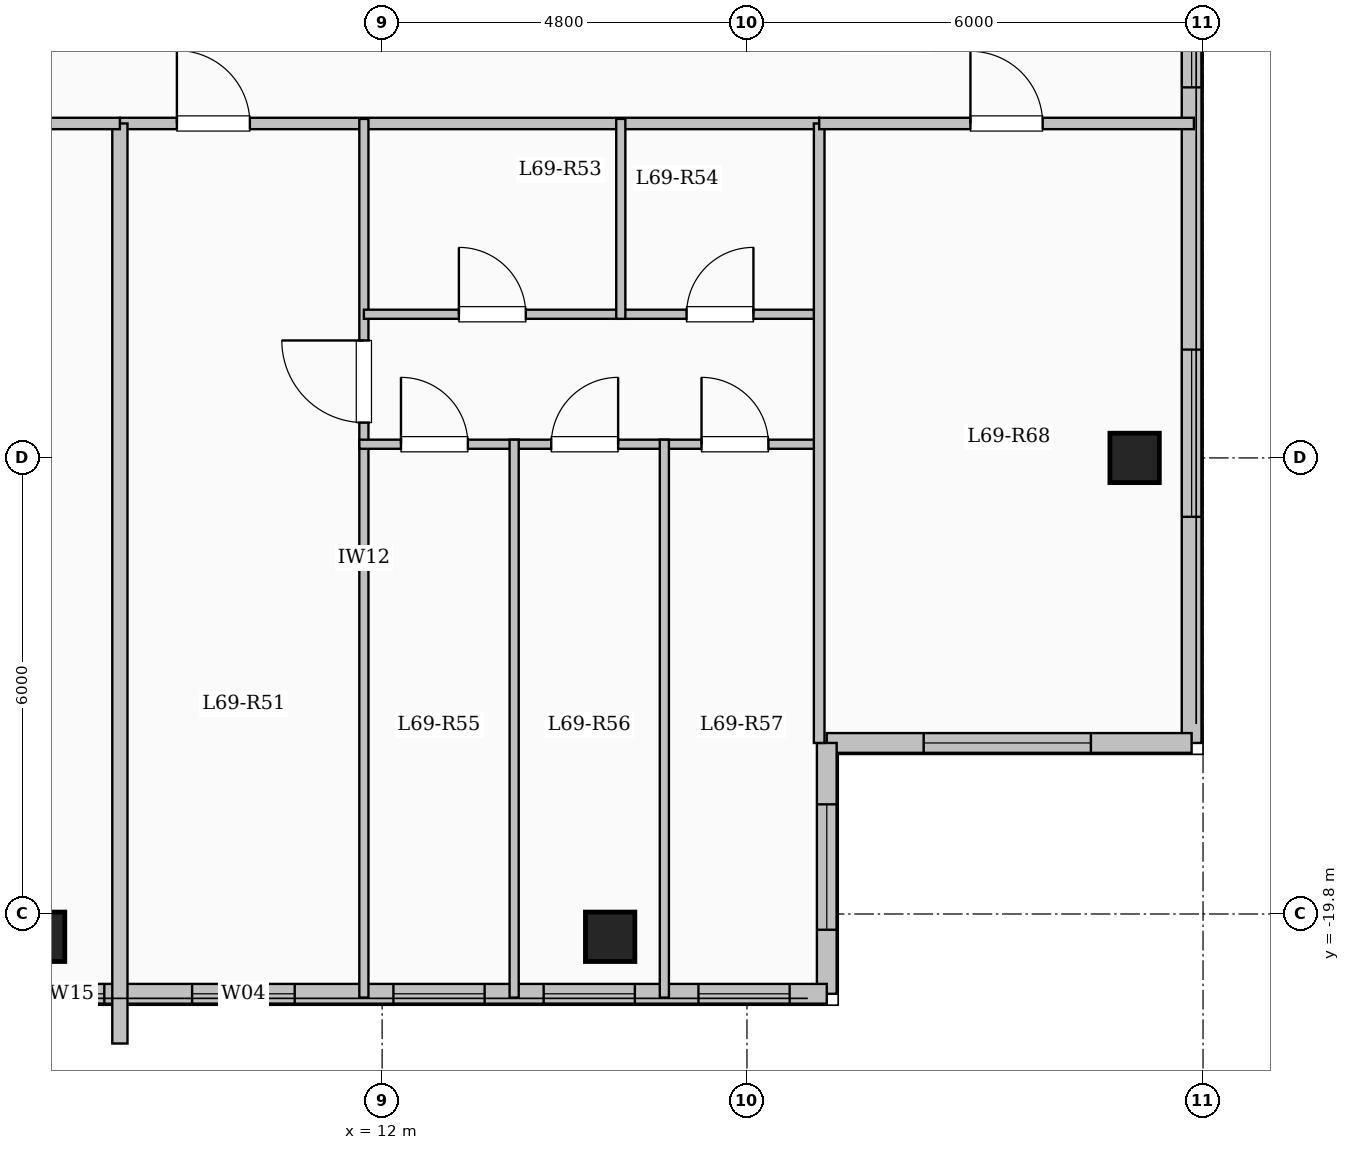
"""IFC4 building model, lengths in metres.
Left out: names, types, materials, properties, quantities, classifications, styles, units other than length and angle.
Written with IfcOpenShell. Run it as: python <this file> out.ifc"""

import sys

from ifc_helpers import new_model, si_unit, direction, frame, frame_2d, origin, origin_2d, place, context, subcontext, project, spatial, rectangle, extrude, element, fill, save


model = new_model("IFC4")
c1 = context("Model", 3, precision=1e-05, world=origin(), true_north=direction((0.0, 1.0)))
c2 = subcontext(c1, "Body", "Model", "MODEL_VIEW")
j1 = project(units=[si_unit("LENGTHUNIT", "METRE"), si_unit("PLANEANGLEUNIT", "RADIAN")], contexts=[c1])
p1 = place(None, origin())
s1 = spatial("IfcSite", under=j1, at=p1, CompositionType="ELEMENT")
p2 = place(p1, origin())
s2 = spatial("IfcBuilding", under=s1, at=p2, CompositionType="ELEMENT")
p3 = place(p2, frame((0.0, 0.0, 254.9)))
s3 = spatial("IfcBuildingStorey", under=s2, at=p3, CompositionType="ELEMENT", Elevation=254.9)
for number, where, z_axis, x_axis in (
    (1, (7.5, -20.1, 0.0), (0.0, 0.0, 1.0), (1.0, 0.0, 0.0)),
    (2, (15.0, -20.1, 0.0), (0.0, 0.0, 1.0), (1.0, 0.0, 0.0)),
    (3, (21.9, -13.8, 0.0), (0.0, 0.0, 1.0), (1.0, 0.0, 0.0)),
):
    element("IfcColumn", number, at=place(p3, frame(where, z_axis=z_axis, x_axis=x_axis)), inside=s3, PredefinedType="COLUMN", context=c2, shape_type="SweptSolid", body=[
        extrude(rectangle(XDim=0.65, YDim=0.65, at=origin_2d()), origin(), (0.0, 0.0, 1.0), 3.35),
    ])
p4 = place(p3, frame((22.65, 17.55, 0.0), z_axis=(0.0, 0.0, 1.0), x_axis=(0.0, -1.0, 0.0)))
e4 = element("IfcWall", 4, at=p4, inside=s3, PredefinedType="SOLIDWALL", context=c2, shape_type="SweptSolid", body=[
    extrude(rectangle(XDim=35.1, YDim=0.26, at=frame_2d((17.55, 0.0))), origin(), (0.0, 0.0, 1.0), 3.1),
])
p5 = place(p4, frame((1.525, 0.0, 0.9)))
e5 = element("IfcOpeningElement", 5, at=p5, cuts=e4, PredefinedType="OPENING", context=c2, shape_type="SweptSolid", body=[
    extrude(rectangle(XDim=2.0, YDim=1.7, at=frame_2d((1.0, 0.85))), frame((0.0, 0.14, 0.0), z_axis=(0.0, -1.0, 0.0), x_axis=(1.0, 0.0, 0.0)), (0.0, 0.0, 1.0), 0.28),
])
p6 = place(p4, frame((5.425, 0.0, 0.95)))
e6 = element("IfcOpeningElement", 6, at=p6, cuts=e4, PredefinedType="OPENING", context=c2, shape_type="SweptSolid", body=[
    extrude(rectangle(XDim=1.0, YDim=1.5, at=frame_2d((0.5, 0.75))), frame((0.0, 0.14, 0.0), z_axis=(0.0, -1.0, 0.0), x_axis=(1.0, 0.0, 0.0)), (0.0, 0.0, 1.0), 0.28),
])
p7 = place(p4, frame((14.8, 0.0, 0.9)))
e7 = element("IfcOpeningElement", 7, at=p7, cuts=e4, PredefinedType="OPENING", context=c2, shape_type="SweptSolid", body=[
    extrude(rectangle(XDim=2.0, YDim=1.7, at=frame_2d((1.0, 0.85))), frame((0.0, 0.14, 0.0), z_axis=(0.0, -1.0, 0.0), x_axis=(1.0, 0.0, 0.0)), (0.0, 0.0, 1.0), 0.28),
])
p8 = place(p4, frame((25.275, 0.0, 0.95)))
e8 = element("IfcOpeningElement", 8, at=p8, cuts=e4, PredefinedType="OPENING", context=c2, shape_type="SweptSolid", body=[
    extrude(rectangle(XDim=1.2, YDim=1.5, at=frame_2d((0.6, 0.75))), frame((0.0, 0.14, 0.0), z_axis=(0.0, -1.0, 0.0), x_axis=(1.0, 0.0, 0.0)), (0.0, 0.0, 1.0), 0.28),
])
p9 = place(p4, frame((29.925, 0.0, 0.9)))
e9 = element("IfcOpeningElement", 9, at=p9, cuts=e4, PredefinedType="OPENING", context=c2, shape_type="SweptSolid", body=[
    extrude(rectangle(XDim=2.2, YDim=1.75, at=frame_2d((1.1, 0.875))), frame((0.0, 0.14, 0.0), z_axis=(0.0, -1.0, 0.0), x_axis=(1.0, 0.0, 0.0)), (0.0, 0.0, 1.0), 0.28),
])
p10 = place(p3, frame((22.65, -17.55, 0.0), z_axis=(0.0, 0.0, 1.0), x_axis=(-1.0, 0.0, 0.0)))
e10 = element("IfcWall", 10, at=p10, inside=s3, PredefinedType="SOLIDWALL", context=c2, shape_type="SweptSolid", body=[
    extrude(rectangle(XDim=4.8, YDim=0.26, at=frame_2d((2.4, 0.0))), origin(), (0.0, 0.0, 1.0), 3.1),
])
p11 = place(p10, frame((1.325, 0.0, 0.9)))
e11 = element("IfcOpeningElement", 11, at=p11, cuts=e10, PredefinedType="OPENING", context=c2, shape_type="SweptSolid", body=[
    extrude(rectangle(XDim=2.2, YDim=1.75, at=frame_2d((1.1, 0.875))), frame((0.0, 0.14, 0.0), z_axis=(0.0, -1.0, 0.0), x_axis=(1.0, 0.0, 0.0)), (0.0, 0.0, 1.0), 0.28),
])
p12 = place(p3, frame((17.85, -17.55, 0.0), z_axis=(0.0, 0.0, 1.0), x_axis=(0.0, -1.0, 0.0)))
e12 = element("IfcWall", 12, at=p12, inside=s3, PredefinedType="SOLIDWALL", context=c2, shape_type="SweptSolid", body=[
    extrude(rectangle(XDim=3.3, YDim=0.26, at=frame_2d((1.65, 0.0))), origin(), (0.0, 0.0, 1.0), 3.1),
])
p13 = place(p12, frame((0.808, 0.0, 0.9)))
e13 = element("IfcOpeningElement", 13, at=p13, cuts=e12, PredefinedType="OPENING", context=c2, shape_type="SweptSolid", body=[
    extrude(rectangle(XDim=1.65, YDim=1.6, at=frame_2d((0.825, 0.8))), frame((0.0, 0.14, 0.0), z_axis=(0.0, -1.0, 0.0), x_axis=(1.0, 0.0, 0.0)), (0.0, 0.0, 1.0), 0.28),
])
p14 = place(p3, frame((17.85, -20.85, 0.0), z_axis=(0.0, 0.0, 1.0), x_axis=(-1.0, 0.0, 0.0)))
e14 = element("IfcWall", 14, at=p14, inside=s3, PredefinedType="SOLIDWALL", context=c2, shape_type="SweptSolid", body=[
    extrude(rectangle(XDim=10.5, YDim=0.26, at=frame_2d((5.25, 0.0))), origin(), (0.0, 0.0, 1.0), 3.1),
])
p15 = place(p14, frame((0.489, 0.0, 0.95)))
e15 = element("IfcOpeningElement", 15, at=p15, cuts=e14, PredefinedType="OPENING", context=c2, shape_type="SweptSolid", body=[
    extrude(rectangle(XDim=1.2, YDim=1.5, at=frame_2d((0.6, 0.75))), frame((0.0, 0.14, 0.0), z_axis=(0.0, -1.0, 0.0), x_axis=(1.0, 0.0, 0.0)), (0.0, 0.0, 1.0), 0.28),
])
p16 = place(p14, frame((2.525, 0.0, 0.95)))
e16 = element("IfcOpeningElement", 16, at=p16, cuts=e14, PredefinedType="OPENING", context=c2, shape_type="SweptSolid", body=[
    extrude(rectangle(XDim=1.2, YDim=1.5, at=frame_2d((0.6, 0.75))), frame((0.0, 0.14, 0.0), z_axis=(0.0, -1.0, 0.0), x_axis=(1.0, 0.0, 0.0)), (0.0, 0.0, 1.0), 0.28),
])
p17 = place(p14, frame((4.501, 0.0, 0.95)))
e17 = element("IfcOpeningElement", 17, at=p17, cuts=e14, PredefinedType="OPENING", context=c2, shape_type="SweptSolid", body=[
    extrude(rectangle(XDim=1.2, YDim=1.5, at=frame_2d((0.6, 0.75))), frame((0.0, 0.14, 0.0), z_axis=(0.0, -1.0, 0.0), x_axis=(1.0, 0.0, 0.0)), (0.0, 0.0, 1.0), 0.28),
])
p18 = place(p14, frame((7.0, 0.0, 0.95)))
e18 = element("IfcOpeningElement", 18, at=p18, cuts=e14, PredefinedType="OPENING", context=c2, shape_type="SweptSolid", body=[
    extrude(rectangle(XDim=1.35, YDim=1.55, at=frame_2d((0.675, 0.775))), frame((0.0, 0.14, 0.0), z_axis=(0.0, -1.0, 0.0), x_axis=(1.0, 0.0, 0.0)), (0.0, 0.0, 1.0), 0.28),
])
p19 = place(p14, frame((9.505, 0.0, 0.95)))
e19 = element("IfcOpeningElement", 19, at=p19, cuts=e14, PredefinedType="OPENING", context=c2, shape_type="SweptSolid", body=[
    extrude(rectangle(XDim=0.85, YDim=1.5, at=frame_2d((0.425, 0.75))), frame((0.0, 0.14, 0.0), z_axis=(0.0, -1.0, 0.0), x_axis=(1.0, 0.0, 0.0)), (0.0, 0.0, 1.0), 0.28),
])
p20 = place(p3, frame((8.55, -9.4, 0.0), z_axis=(0.0, 0.0, 1.0), x_axis=(1.0, 0.0, 0.0)))
e20 = element("IfcWall", 20, at=p20, inside=s3, PredefinedType="PARTITIONING", context=c2, shape_type="SweptSolid", body=[
    extrude(rectangle(XDim=9.2, YDim=0.15, at=frame_2d((4.6, 0.0))), origin(), (0.0, 0.0, 1.0), 3.1),
])
p21 = place(p20, frame((0.75, 0.0, 0.0)))
e21 = element("IfcOpeningElement", 21, at=p21, cuts=e20, PredefinedType="OPENING", context=c2, shape_type="SweptSolid", body=[
    extrude(rectangle(XDim=0.96, YDim=2.15, at=frame_2d((0.48, 1.075))), frame((0.0, 0.085, 0.0), z_axis=(0.0, -1.0, 0.0), x_axis=(1.0, 0.0, 0.0)), (0.0, 0.0, 1.0), 0.17),
])
p22 = place(p3, frame((11.76, -20.9, 0.0), z_axis=(0.0, 0.0, 1.0), x_axis=(0.0, 1.0, 0.0)))
e22 = element("IfcWall", 22, at=p22, inside=s3, PredefinedType="PARTITIONING", context=c2, shape_type="SweptSolid", body=[
    extrude(rectangle(XDim=11.56, YDim=0.12, at=frame_2d((5.78, 0.0))), origin(), (0.0, 0.0, 1.0), 3.1),
])
p23 = place(p22, frame((7.565, 0.0, 0.0)))
e23 = element("IfcOpeningElement", 23, at=p23, cuts=e22, PredefinedType="OPENING", context=c2, shape_type="SweptSolid", body=[
    extrude(rectangle(XDim=1.08, YDim=2.15, at=frame_2d((0.54, 1.075))), frame((0.0, 0.07, 0.0), z_axis=(0.0, -1.0, 0.0), x_axis=(1.0, 0.0, 0.0)), (0.0, 0.0, 1.0), 0.14),
])
p24 = place(p3, frame((11.76, -11.91, 0.0), z_axis=(0.0, 0.0, 1.0), x_axis=(1.0, 0.0, 0.0)))
e24 = element("IfcWall", 24, at=p24, inside=s3, PredefinedType="PARTITIONING", context=c2, shape_type="SweptSolid", body=[
    extrude(rectangle(XDim=3.38, YDim=0.12, at=frame_2d((1.69, 0.0))), origin(), (0.0, 0.0, 1.0), 3.1),
])
p25 = place(p24, frame((1.25, 0.0, 0.0)))
e25 = element("IfcOpeningElement", 25, at=p25, cuts=e24, PredefinedType="OPENING", context=c2, shape_type="SweptSolid", body=[
    extrude(rectangle(XDim=0.88, YDim=2.1, at=frame_2d((0.44, 1.05))), frame((0.0, 0.07, 0.0), z_axis=(0.0, -1.0, 0.0), x_axis=(1.0, 0.0, 0.0)), (0.0, 0.0, 1.0), 0.14),
])
p26 = place(p3, frame((15.14, -11.91, 0.0), z_axis=(0.0, 0.0, 1.0), x_axis=(1.0, 0.0, 0.0)))
e26 = element("IfcWall", 26, at=p26, inside=s3, PredefinedType="PARTITIONING", context=c2, shape_type="SweptSolid", body=[
    extrude(rectangle(XDim=2.61, YDim=0.12, at=frame_2d((1.305, 0.0))), origin(), (0.0, 0.0, 1.0), 3.1),
])
p27 = place(p26, frame((0.865, 0.0, 0.0)))
e27 = element("IfcOpeningElement", 27, at=p27, cuts=e26, PredefinedType="OPENING", context=c2, shape_type="SweptSolid", body=[
    extrude(rectangle(XDim=0.88, YDim=2.1, at=frame_2d((0.44, 1.05))), frame((0.0, 0.07, 0.0), z_axis=(0.0, -1.0, 0.0), x_axis=(1.0, 0.0, 0.0)), (0.0, 0.0, 1.0), 0.14),
])
p28 = place(p3, frame((11.7, -13.62, 0.0), z_axis=(0.0, 0.0, 1.0), x_axis=(1.0, 0.0, 0.0)))
e28 = element("IfcWall", 28, at=p28, inside=s3, PredefinedType="PARTITIONING", context=c2, shape_type="SweptSolid", body=[
    extrude(rectangle(XDim=6.11, YDim=0.12, at=frame_2d((3.055, 0.0))), origin(), (0.0, 0.0, 1.0), 3.1),
])
p29 = place(p28, frame((0.548, 0.0, 0.0)))
e29 = element("IfcOpeningElement", 29, at=p29, cuts=e28, PredefinedType="OPENING", context=c2, shape_type="SweptSolid", body=[
    extrude(rectangle(XDim=0.88, YDim=2.1, at=frame_2d((0.44, 1.05))), frame((0.0, 0.07, 0.0), z_axis=(0.0, -1.0, 0.0), x_axis=(1.0, 0.0, 0.0)), (0.0, 0.0, 1.0), 0.14),
])
p30 = place(p28, frame((2.525, 0.0, 0.0)))
e30 = element("IfcOpeningElement", 30, at=p30, cuts=e28, PredefinedType="OPENING", context=c2, shape_type="SweptSolid", body=[
    extrude(rectangle(XDim=0.88, YDim=2.1, at=frame_2d((0.44, 1.05))), frame((0.0, 0.07, 0.0), z_axis=(0.0, -1.0, 0.0), x_axis=(1.0, 0.0, 0.0)), (0.0, 0.0, 1.0), 0.14),
])
p31 = place(p28, frame((4.502, 0.0, 0.0)))
e31 = element("IfcOpeningElement", 31, at=p31, cuts=e28, PredefinedType="OPENING", context=c2, shape_type="SweptSolid", body=[
    extrude(rectangle(XDim=0.88, YDim=2.1, at=frame_2d((0.44, 1.05))), frame((0.0, 0.07, 0.0), z_axis=(0.0, -1.0, 0.0), x_axis=(1.0, 0.0, 0.0)), (0.0, 0.0, 1.0), 0.14),
])
p32 = place(p3, frame((15.14, -11.97, 0.0), z_axis=(0.0, 0.0, 1.0), x_axis=(0.0, 1.0, 0.0)))
e32 = element("IfcWall", 32, at=p32, inside=s3, PredefinedType="PARTITIONING", context=c2, shape_type="SweptSolid", body=[
    extrude(rectangle(XDim=2.63, YDim=0.12, at=frame_2d((1.315, 0.0))), origin(), (0.0, 0.0, 1.0), 2.685),
])
for number, where, z_axis, x_axis in (
    (33, (13.737, -20.9, 0.0), (0.0, 0.0, 1.0), (0.0, 1.0, 0.0)),
    (34, (15.713, -20.9, 0.0), (0.0, 0.0, 1.0), (0.0, 1.0, 0.0)),
):
    element("IfcWall", number, at=place(p3, frame(where, z_axis=z_axis, x_axis=x_axis)), inside=s3, PredefinedType="PARTITIONING", context=c2, shape_type="SweptSolid", body=[
        extrude(rectangle(XDim=7.34, YDim=0.12, at=frame_2d((3.67, 0.0))), origin(), (0.0, 0.0, 1.0), 3.1),
    ])
p33 = place(p3, frame((8.55, -21.504, 0.0), z_axis=(0.0, 0.0, 1.0), x_axis=(0.0, 1.0, 0.0)))
e35 = element("IfcWall", 35, at=p33, inside=s3, PredefinedType="SOLIDWALL", context=c2, shape_type="SweptSolid", body=[
    extrude(rectangle(XDim=12.104, YDim=0.2, at=frame_2d((6.052, 0.0))), origin(), (0.0, 0.0, 1.0), 3.1),
])
p34 = place(p3, frame((-8.55, -9.4, 0.0), z_axis=(0.0, 0.0, 1.0), x_axis=(1.0, 0.0, 0.0)))
e36 = element("IfcWall", 36, at=p34, inside=s3, PredefinedType="PARTITIONING", context=c2, shape_type="SweptSolid", body=[
    extrude(rectangle(XDim=17.1, YDim=0.15, at=frame_2d((8.55, 0.0))), origin(), (0.0, 0.0, 1.0), 3.1),
])
p35 = place(p34, frame((1.75, 0.0, 0.0)))
e37 = element("IfcOpeningElement", 37, at=p35, cuts=e36, PredefinedType="OPENING", context=c2, shape_type="SweptSolid", body=[
    extrude(rectangle(XDim=0.95, YDim=2.15, at=frame_2d((0.475, 1.075))), frame((0.0, 0.085, 0.0), z_axis=(0.0, -1.0, 0.0), x_axis=(1.0, 0.0, 0.0)), (0.0, 0.0, 1.0), 0.17),
])
p36 = place(p34, frame((10.5, 0.0, 0.0)))
e38 = element("IfcOpeningElement", 38, at=p36, cuts=e36, PredefinedType="OPENING", context=c2, shape_type="SweptSolid", body=[
    extrude(rectangle(XDim=0.95, YDim=2.15, at=frame_2d((0.475, 1.075))), frame((0.0, 0.085, 0.0), z_axis=(0.0, -1.0, 0.0), x_axis=(1.0, 0.0, 0.0)), (0.0, 0.0, 1.0), 0.17),
])
p37 = place(p3, frame((17.75, -17.55, 0.0), z_axis=(0.0, 0.0, 1.0), x_axis=(0.0, 1.0, 0.0)))
e39 = element("IfcWall", 39, at=p37, inside=s3, PredefinedType="PARTITIONING", context=c2, shape_type="SweptSolid", body=[
    extrude(rectangle(XDim=8.15, YDim=0.14, at=frame_2d((4.075, 0.0))), origin(), (0.0, 0.0, 1.0), 3.1),
])
p38 = place(p3, frame((17.75, -9.4, 0.0), z_axis=(0.0, 0.0, 1.0), x_axis=(1.0, 0.0, 0.0)))
e40 = element("IfcWall", 40, at=p38, inside=s3, PredefinedType="PARTITIONING", context=c2, shape_type="SweptSolid", body=[
    extrude(rectangle(XDim=4.93, YDim=0.15, at=frame_2d((2.465, 0.0))), origin(), (0.0, 0.0, 1.0), 3.1),
])
p39 = place(p38, frame((1.99, 0.0, 0.0)))
e41 = element("IfcOpeningElement", 41, at=p39, cuts=e40, PredefinedType="OPENING", context=c2, shape_type="SweptSolid", body=[
    extrude(rectangle(XDim=0.95, YDim=2.15, at=frame_2d((0.475, 1.075))), frame((0.0, 0.085, 0.0), z_axis=(0.0, -1.0, 0.0), x_axis=(1.0, 0.0, 0.0)), (0.0, 0.0, 1.0), 0.17),
])
p40 = place(p8, origin())
e42 = element("IfcWindow", 42, at=p40, inside=s3, PartitioningType="SINGLE_PANEL", PredefinedType="WINDOW", context=c2, shape_type="SweptSolid", body=[
    extrude(rectangle(XDim=1.2, YDim=1.5, at=frame_2d((0.6, 0.75))), frame((0.0, 0.03, 0.0), z_axis=(0.0, -1.0, 0.0), x_axis=(1.0, 0.0, 0.0)), (0.0, 0.0, 1.0), 0.06),
])
fill(e8, e42)
p41 = place(p9, origin())
e43 = element("IfcWindow", 43, at=p41, inside=s3, PartitioningType="SINGLE_PANEL", PredefinedType="WINDOW", context=c2, shape_type="SweptSolid", body=[
    extrude(rectangle(XDim=2.2, YDim=1.75, at=frame_2d((1.1, 0.875))), frame((0.0, 0.03, 0.0), z_axis=(0.0, -1.0, 0.0), x_axis=(1.0, 0.0, 0.0)), (0.0, 0.0, 1.0), 0.06),
])
fill(e9, e43)
p42 = place(p11, origin())
e44 = element("IfcWindow", 44, at=p42, inside=s3, PartitioningType="SINGLE_PANEL", PredefinedType="WINDOW", context=c2, shape_type="SweptSolid", body=[
    extrude(rectangle(XDim=2.2, YDim=1.75, at=frame_2d((1.1, 0.875))), frame((0.0, 0.03, 0.0), z_axis=(0.0, -1.0, 0.0), x_axis=(1.0, 0.0, 0.0)), (0.0, 0.0, 1.0), 0.06),
])
fill(e11, e44)
p43 = place(p13, origin())
e45 = element("IfcWindow", 45, at=p43, inside=s3, PartitioningType="SINGLE_PANEL", PredefinedType="WINDOW", context=c2, shape_type="SweptSolid", body=[
    extrude(rectangle(XDim=1.65, YDim=1.6, at=frame_2d((0.825, 0.8))), frame((0.0, 0.03, 0.0), z_axis=(0.0, -1.0, 0.0), x_axis=(1.0, 0.0, 0.0)), (0.0, 0.0, 1.0), 0.06),
])
fill(e13, e45)
p44 = place(p15, origin())
e46 = element("IfcWindow", 46, at=p44, inside=s3, PartitioningType="SINGLE_PANEL", PredefinedType="WINDOW", context=c2, shape_type="SweptSolid", body=[
    extrude(rectangle(XDim=1.2, YDim=1.5, at=frame_2d((0.6, 0.75))), frame((0.0, 0.03, 0.0), z_axis=(0.0, -1.0, 0.0), x_axis=(1.0, 0.0, 0.0)), (0.0, 0.0, 1.0), 0.06),
])
fill(e15, e46)
p45 = place(p16, origin())
e47 = element("IfcWindow", 47, at=p45, inside=s3, PartitioningType="SINGLE_PANEL", PredefinedType="WINDOW", context=c2, shape_type="SweptSolid", body=[
    extrude(rectangle(XDim=1.2, YDim=1.5, at=frame_2d((0.6, 0.75))), frame((0.0, 0.03, 0.0), z_axis=(0.0, -1.0, 0.0), x_axis=(1.0, 0.0, 0.0)), (0.0, 0.0, 1.0), 0.06),
])
fill(e16, e47)
p46 = place(p17, origin())
e48 = element("IfcWindow", 48, at=p46, inside=s3, PartitioningType="SINGLE_PANEL", PredefinedType="WINDOW", context=c2, shape_type="SweptSolid", body=[
    extrude(rectangle(XDim=1.2, YDim=1.5, at=frame_2d((0.6, 0.75))), frame((0.0, 0.03, 0.0), z_axis=(0.0, -1.0, 0.0), x_axis=(1.0, 0.0, 0.0)), (0.0, 0.0, 1.0), 0.06),
])
fill(e17, e48)
p47 = place(p18, origin())
e49 = element("IfcWindow", 49, at=p47, inside=s3, PartitioningType="SINGLE_PANEL", PredefinedType="WINDOW", context=c2, shape_type="SweptSolid", body=[
    extrude(rectangle(XDim=1.35, YDim=1.55, at=frame_2d((0.675, 0.775))), frame((0.0, 0.03, 0.0), z_axis=(0.0, -1.0, 0.0), x_axis=(1.0, 0.0, 0.0)), (0.0, 0.0, 1.0), 0.06),
])
fill(e18, e49)
p48 = place(p19, origin())
e50 = element("IfcWindow", 50, at=p48, inside=s3, PartitioningType="SINGLE_PANEL", PredefinedType="WINDOW", context=c2, shape_type="SweptSolid", body=[
    extrude(rectangle(XDim=0.85, YDim=1.5, at=frame_2d((0.425, 0.75))), frame((0.0, 0.03, 0.0), z_axis=(0.0, -1.0, 0.0), x_axis=(1.0, 0.0, 0.0)), (0.0, 0.0, 1.0), 0.06),
])
fill(e19, e50)
p49 = place(p21, origin())
e51 = element("IfcDoor", 51, at=p49, inside=s3, OperationType="SINGLE_SWING_LEFT", PredefinedType="DOOR", context=c2, shape_type="SweptSolid", body=[
    extrude(rectangle(XDim=0.96, YDim=2.15, at=frame_2d((0.48, 1.075))), frame((0.0, 0.025, 0.0), z_axis=(0.0, -1.0, 0.0), x_axis=(1.0, 0.0, 0.0)), (0.0, 0.0, 1.0), 0.05),
])
fill(e21, e51)
p50 = place(p23, origin())
e52 = element("IfcDoor", 52, at=p50, inside=s3, OperationType="SINGLE_SWING_RIGHT", PredefinedType="DOOR", context=c2, shape_type="SweptSolid", body=[
    extrude(rectangle(XDim=1.08, YDim=2.15, at=frame_2d((0.54, 1.075))), frame((0.0, 0.025, 0.0), z_axis=(0.0, -1.0, 0.0), x_axis=(1.0, 0.0, 0.0)), (0.0, 0.0, 1.0), 0.05),
])
fill(e23, e52)
p51 = place(p25, origin())
e53 = element("IfcDoor", 53, at=p51, inside=s3, OperationType="SINGLE_SWING_LEFT", PredefinedType="DOOR", context=c2, shape_type="SweptSolid", body=[
    extrude(rectangle(XDim=0.88, YDim=2.1, at=frame_2d((0.44, 1.05))), frame((0.0, 0.025, 0.0), z_axis=(0.0, -1.0, 0.0), x_axis=(1.0, 0.0, 0.0)), (0.0, 0.0, 1.0), 0.05),
])
fill(e25, e53)
p52 = place(p27, origin())
e54 = element("IfcDoor", 54, at=p52, inside=s3, OperationType="SINGLE_SWING_RIGHT", PredefinedType="DOOR", context=c2, shape_type="SweptSolid", body=[
    extrude(rectangle(XDim=0.88, YDim=2.1, at=frame_2d((0.44, 1.05))), frame((0.0, 0.025, 0.0), z_axis=(0.0, -1.0, 0.0), x_axis=(1.0, 0.0, 0.0)), (0.0, 0.0, 1.0), 0.05),
])
fill(e27, e54)
p53 = place(p29, origin())
e55 = element("IfcDoor", 55, at=p53, inside=s3, OperationType="SINGLE_SWING_LEFT", PredefinedType="DOOR", context=c2, shape_type="SweptSolid", body=[
    extrude(rectangle(XDim=0.88, YDim=2.1, at=frame_2d((0.44, 1.05))), frame((0.0, 0.025, 0.0), z_axis=(0.0, -1.0, 0.0), x_axis=(1.0, 0.0, 0.0)), (0.0, 0.0, 1.0), 0.05),
])
fill(e29, e55)
p54 = place(p30, origin())
e56 = element("IfcDoor", 56, at=p54, inside=s3, OperationType="SINGLE_SWING_RIGHT", PredefinedType="DOOR", context=c2, shape_type="SweptSolid", body=[
    extrude(rectangle(XDim=0.88, YDim=2.1, at=frame_2d((0.44, 1.05))), frame((0.0, 0.025, 0.0), z_axis=(0.0, -1.0, 0.0), x_axis=(1.0, 0.0, 0.0)), (0.0, 0.0, 1.0), 0.05),
])
fill(e30, e56)
p55 = place(p31, origin())
e57 = element("IfcDoor", 57, at=p55, inside=s3, OperationType="SINGLE_SWING_LEFT", PredefinedType="DOOR", context=c2, shape_type="SweptSolid", body=[
    extrude(rectangle(XDim=0.88, YDim=2.1, at=frame_2d((0.44, 1.05))), frame((0.0, 0.025, 0.0), z_axis=(0.0, -1.0, 0.0), x_axis=(1.0, 0.0, 0.0)), (0.0, 0.0, 1.0), 0.05),
])
fill(e31, e57)
p56 = place(p39, origin())
e58 = element("IfcDoor", 58, at=p56, inside=s3, OperationType="SINGLE_SWING_LEFT", PredefinedType="DOOR", context=c2, shape_type="SweptSolid", body=[
    extrude(rectangle(XDim=0.95, YDim=2.15, at=frame_2d((0.475, 1.075))), frame((0.0, 0.025, 0.0), z_axis=(0.0, -1.0, 0.0), x_axis=(1.0, 0.0, 0.0)), (0.0, 0.0, 1.0), 0.05),
])
fill(e41, e58)
save(model, sys.argv[1])
